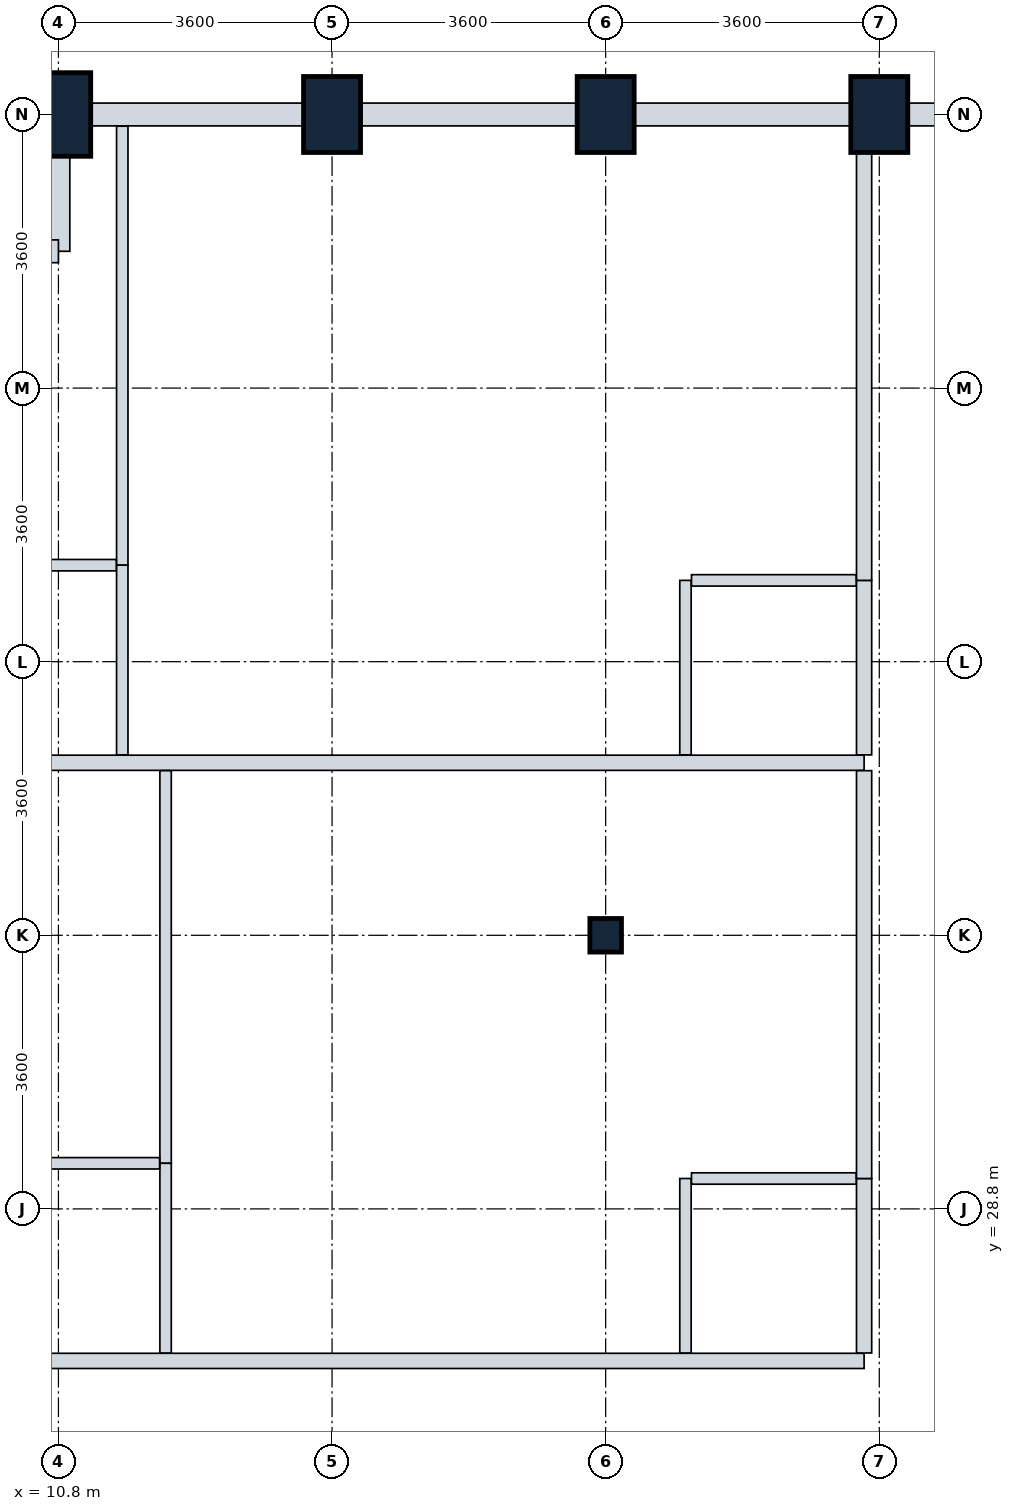
"""IFC4 building model, lengths in metres.
Left out: names, types, materials, properties, quantities, classifications, styles, units other than length and angle.
Written with IfcOpenShell. Run it as: python <this file> out.ifc"""

import sys

from ifc_helpers import new_model, si_unit, direction, frame, frame_2d, origin, origin_2d, place, context, subcontext, project, spatial, rectangle, i_section, extrude, element, fill, save


model = new_model("IFC4")
c1 = context("Model", 3, precision=1e-05, world=origin(), true_north=direction((0.0, 1.0)))
c2 = subcontext(c1, "Body", "Model", "MODEL_VIEW")
j1 = project(units=[si_unit("LENGTHUNIT", "METRE"), si_unit("PLANEANGLEUNIT", "RADIAN")], contexts=[c1])
p1 = place(None, origin())
s1 = spatial("IfcSite", under=j1, at=p1, CompositionType="ELEMENT")
p2 = place(p1, origin())
s2 = spatial("IfcBuilding", under=s1, at=p2, CompositionType="ELEMENT")
p3 = place(p2, frame((0.0, 0.0, 139.0)))
s3 = spatial("IfcBuildingStorey", under=s2, at=p3, CompositionType="ELEMENT", Elevation=139.0)
p4 = place(p3, frame((10.8, 43.2, 0.0), z_axis=(0.0, 0.0, 1.0), x_axis=(1.0, 0.0, 0.0)))
e1 = element("IfcColumn", 1, at=p4, inside=s3, PredefinedType="COLUMN", context=c2, shape_type="SweptSolid", body=[
    extrude(rectangle(XDim=0.85, YDim=1.1, at=origin_2d()), origin(), (0.0, 0.0, 1.0), 3.8),
])
p5 = place(p3, frame((14.4, 43.2, 0.0), z_axis=(0.0, 0.0, 1.0), x_axis=(1.0, 0.0, 0.0)))
e2 = element("IfcColumn", 2, at=p5, inside=s3, PredefinedType="COLUMN", context=c2, shape_type="SweptSolid", body=[
    extrude(rectangle(XDim=0.75, YDim=1.0, at=origin_2d()), origin(), (0.0, 0.0, 1.0), 3.8),
])
p6 = place(p3, frame((18.0, 32.4, 0.0), z_axis=(0.0, 0.0, 1.0), x_axis=(1.0, 0.0, 0.0)))
e3 = element("IfcColumn", 3, at=p6, inside=s3, PredefinedType="COLUMN", context=c2, shape_type="SweptSolid", body=[
    extrude(i_section(OverallWidth=0.416, OverallDepth=0.442, WebThickness=0.025, FlangeThickness=0.041, FilletRadius=0.015, at=origin_2d()), origin(), (0.0, 0.0, 1.0), 3.8),
])
for number, where, z_axis, x_axis in (
    (4, (18.0, 43.2, 0.0), (0.0, 0.0, 1.0), (1.0, 0.0, 0.0)),
    (5, (21.6, 43.2, 0.0), (0.0, 0.0, 1.0), (1.0, 0.0, 0.0)),
):
    element("IfcColumn", number, at=place(p3, frame(where, z_axis=z_axis, x_axis=x_axis)), inside=s3, PredefinedType="COLUMN", context=c2, shape_type="SweptSolid", body=[
        extrude(rectangle(XDim=0.75, YDim=1.0, at=origin_2d()), origin(), (0.0, 0.0, 1.0), 3.8),
    ])
p7 = place(p3, frame((21.6, 43.2, 0.0), z_axis=(0.0, 0.0, 1.0), x_axis=(1.0, 0.0, 0.0)))
e6 = element("IfcWall", 6, at=p7, inside=s3, PredefinedType="STANDARD", context=c2, shape_type="SweptSolid", body=[
    extrude(rectangle(XDim=3.6, YDim=0.3, at=frame_2d((1.8, 0.0))), origin(), (0.0, 0.0, 1.0), 2.93),
])
p8 = place(p3, frame((18.0, 43.2, 0.0), z_axis=(0.0, 0.0, 1.0), x_axis=(1.0, 0.0, 0.0)))
e7 = element("IfcWall", 7, at=p8, inside=s3, PredefinedType="STANDARD", context=c2, shape_type="SweptSolid", body=[
    extrude(rectangle(XDim=3.6, YDim=0.3, at=frame_2d((1.8, 0.0))), origin(), (0.0, 0.0, 1.0), 2.93),
])
p9 = place(p8, frame((0.75, 0.0, 0.85)))
e8 = element("IfcOpeningElement", 8, at=p9, cuts=e7, PredefinedType="OPENING", context=c2, shape_type="SweptSolid", body=[
    extrude(rectangle(XDim=2.1, YDim=1.35, at=frame_2d((1.05, 0.675))), frame((0.0, 0.16, 0.0), z_axis=(0.0, -1.0, 0.0), x_axis=(1.0, 0.0, 0.0)), (0.0, 0.0, 1.0), 0.32),
])
p10 = place(p3, frame((14.4, 43.2, 0.0), z_axis=(0.0, 0.0, 1.0), x_axis=(1.0, 0.0, 0.0)))
e9 = element("IfcWall", 9, at=p10, inside=s3, PredefinedType="STANDARD", context=c2, shape_type="SweptSolid", body=[
    extrude(rectangle(XDim=3.6, YDim=0.3, at=frame_2d((1.8, 0.0))), origin(), (0.0, 0.0, 1.0), 2.93),
])
p11 = place(p10, frame((0.75, 0.0, 0.85)))
e10 = element("IfcOpeningElement", 10, at=p11, cuts=e9, PredefinedType="OPENING", context=c2, shape_type="SweptSolid", body=[
    extrude(rectangle(XDim=2.1, YDim=1.35, at=frame_2d((1.05, 0.675))), frame((0.0, 0.16, 0.0), z_axis=(0.0, -1.0, 0.0), x_axis=(1.0, 0.0, 0.0)), (0.0, 0.0, 1.0), 0.32),
])
p12 = place(p3, frame((10.8, 43.2, 0.0), z_axis=(0.0, 0.0, 1.0), x_axis=(1.0, 0.0, 0.0)))
e11 = element("IfcWall", 11, at=p12, inside=s3, PredefinedType="STANDARD", context=c2, shape_type="SweptSolid", body=[
    extrude(rectangle(XDim=3.6, YDim=0.3, at=frame_2d((1.8, 0.0))), origin(), (0.0, 0.0, 1.0), 2.93),
])
p13 = place(p3, frame((10.8, 41.4, 0.0), z_axis=(0.0, 0.0, 1.0), x_axis=(0.0, 1.0, 0.0)))
e12 = element("IfcWall", 12, at=p13, inside=s3, PredefinedType="STANDARD", context=c2, shape_type="SweptSolid", body=[
    extrude(rectangle(XDim=1.8, YDim=0.3, at=frame_2d((0.9, 0.0))), origin(), (0.0, 0.0, 1.0), 2.93),
])
p14 = place(p13, frame((0.18, 0.0, 0.85)))
e13 = element("IfcOpeningElement", 13, at=p14, cuts=e12, PredefinedType="OPENING", context=c2, shape_type="SweptSolid", body=[
    extrude(rectangle(XDim=0.75, YDim=1.05, at=frame_2d((0.375, 0.525))), frame((0.0, 0.16, 0.0), z_axis=(0.0, -1.0, 0.0), x_axis=(1.0, 0.0, 0.0)), (0.0, 0.0, 1.0), 0.32),
])
p15 = place(p3, frame((9.0, 41.4, 0.0), z_axis=(0.0, 0.0, 1.0), x_axis=(1.0, 0.0, 0.0)))
e14 = element("IfcWall", 14, at=p15, inside=s3, PredefinedType="STANDARD", context=c2, shape_type="SweptSolid", body=[
    extrude(rectangle(XDim=1.8, YDim=0.3, at=frame_2d((0.9, 0.0))), origin(), (0.0, 0.0, 1.0), 3.535),
])
for number, where, z_axis, x_axis in (
    (15, (7.354, 26.8, 0.0), (0.0, 0.0, 1.0), (1.0, 0.0, 0.0)),
    (16, (7.354, 34.67, 0.0), (0.0, 0.0, 1.0), (1.0, 0.0, 0.0)),
):
    element("IfcWall", number, at=place(p3, frame(where, z_axis=z_axis, x_axis=x_axis)), inside=s3, PredefinedType="PARTITIONING", context=c2, shape_type="SweptSolid", body=[
        extrude(rectangle(XDim=14.046, YDim=0.2, at=frame_2d((7.023, 0.0))), origin(), (0.0, 0.0, 1.0), 2.93),
    ])
p16 = place(p3, frame((21.4, 26.904, 0.0), z_axis=(0.0, 0.0, 1.0), x_axis=(0.0, 1.0, 0.0)))
e17 = element("IfcWall", 17, at=p16, inside=s3, PredefinedType="PARTITIONING", context=c2, shape_type="SweptSolid", body=[
    extrude(rectangle(XDim=2.296, YDim=0.2, at=frame_2d((1.148, 0.0))), origin(), (0.0, 0.0, 1.0), 3.13),
])
p17 = place(p3, frame((19.05, 26.904, 0.0), z_axis=(0.0, 0.0, 1.0), x_axis=(0.0, 1.0, 0.0)))
e18 = element("IfcWall", 18, at=p17, inside=s3, PredefinedType="PARTITIONING", context=c2, shape_type="SweptSolid", body=[
    extrude(rectangle(XDim=2.296, YDim=0.15, at=frame_2d((1.148, 0.0))), origin(), (0.0, 0.0, 1.0), 3.17),
])
p18 = place(p3, frame((19.129, 29.2, 0.0), z_axis=(0.0, 0.0, 1.0), x_axis=(1.0, 0.0, 0.0)))
e19 = element("IfcWall", 19, at=p18, inside=s3, PredefinedType="PARTITIONING", context=c2, shape_type="SweptSolid", body=[
    extrude(rectangle(XDim=2.167, YDim=0.15, at=frame_2d((1.083, 0.0))), origin(), (0.0, 0.0, 1.0), 3.535),
])
p19 = place(p18, frame((0.641, 0.0, 0.0)))
e20 = element("IfcOpeningElement", 20, at=p19, cuts=e19, PredefinedType="OPENING", context=c2, shape_type="SweptSolid", body=[
    extrude(rectangle(XDim=0.85, YDim=2.1, at=frame_2d((0.425, 1.05))), frame((0.0, 0.085, 0.0), z_axis=(0.0, -1.0, 0.0), x_axis=(1.0, 0.0, 0.0)), (0.0, 0.0, 1.0), 0.17),
])
p20 = place(p3, frame((21.4, 29.2, 0.0), z_axis=(0.0, 0.0, 1.0), x_axis=(0.0, 1.0, 0.0)))
e21 = element("IfcWall", 21, at=p20, inside=s3, PredefinedType="PARTITIONING", context=c2, shape_type="SweptSolid", body=[
    extrude(rectangle(XDim=5.366, YDim=0.2, at=frame_2d((2.683, 0.0))), origin(), (0.0, 0.0, 1.0), 3.13),
])
p21 = place(p20, frame((1.557, 0.0, 0.0)))
e22 = element("IfcOpeningElement", 22, at=p21, cuts=e21, PredefinedType="OPENING", context=c2, shape_type="SweptSolid", body=[
    extrude(rectangle(XDim=1.0, YDim=2.1, at=frame_2d((0.5, 1.05))), frame((0.0, 0.11, 0.0), z_axis=(0.0, -1.0, 0.0), x_axis=(1.0, 0.0, 0.0)), (0.0, 0.0, 1.0), 0.22),
])
p22 = place(p3, frame((12.21, 29.4, 0.0), z_axis=(0.0, 0.0, 1.0), x_axis=(0.0, 1.0, 0.0)))
e23 = element("IfcWall", 23, at=p22, inside=s3, PredefinedType="PARTITIONING", context=c2, shape_type="SweptSolid", body=[
    extrude(rectangle(XDim=5.166, YDim=0.15, at=frame_2d((2.583, 0.0))), origin(), (0.0, 0.0, 1.0), 3.18),
])
p23 = place(p22, frame((2.185, 0.0, 0.0)))
e24 = element("IfcOpeningElement", 24, at=p23, cuts=e23, PredefinedType="OPENING", context=c2, shape_type="SweptSolid", body=[
    extrude(rectangle(XDim=0.9, YDim=2.1, at=frame_2d((0.45, 1.05))), frame((0.0, 0.085, 0.0), z_axis=(0.0, -1.0, 0.0), x_axis=(1.0, 0.0, 0.0)), (0.0, 0.0, 1.0), 0.17),
])
p24 = place(p3, frame((12.21, 26.904, 0.0), z_axis=(0.0, 0.0, 1.0), x_axis=(0.0, 1.0, 0.0)))
e25 = element("IfcWall", 25, at=p24, inside=s3, PredefinedType="PARTITIONING", context=c2, shape_type="SweptSolid", body=[
    extrude(rectangle(XDim=2.496, YDim=0.15, at=frame_2d((1.248, 0.0))), origin(), (0.0, 0.0, 1.0), 3.17),
])
p25 = place(p24, frame((0.731, 0.0, 0.0)))
e26 = element("IfcOpeningElement", 26, at=p25, cuts=e25, PredefinedType="OPENING", context=c2, shape_type="SweptSolid", body=[
    extrude(rectangle(XDim=0.85, YDim=2.1, at=frame_2d((0.425, 1.05))), frame((0.0, 0.085, 0.0), z_axis=(0.0, -1.0, 0.0), x_axis=(1.0, 0.0, 0.0)), (0.0, 0.0, 1.0), 0.17),
])
p26 = place(p3, frame((7.354, 29.4, 0.0), z_axis=(0.0, 0.0, 1.0), x_axis=(1.0, 0.0, 0.0)))
e27 = element("IfcWall", 27, at=p26, inside=s3, PredefinedType="PARTITIONING", context=c2, shape_type="SweptSolid", body=[
    extrude(rectangle(XDim=4.777, YDim=0.15, at=frame_2d((2.389, 0.0))), origin(), (0.0, 0.0, 1.0), 2.93),
])
p27 = place(p3, frame((21.4, 34.774, 0.0), z_axis=(0.0, 0.0, 1.0), x_axis=(0.0, 1.0, 0.0)))
e28 = element("IfcWall", 28, at=p27, inside=s3, PredefinedType="PARTITIONING", context=c2, shape_type="SweptSolid", body=[
    extrude(rectangle(XDim=2.296, YDim=0.2, at=frame_2d((1.148, 0.0))), origin(), (0.0, 0.0, 1.0), 3.17),
])
p28 = place(p3, frame((19.05, 34.774, 0.0), z_axis=(0.0, 0.0, 1.0), x_axis=(0.0, 1.0, 0.0)))
e29 = element("IfcWall", 29, at=p28, inside=s3, PredefinedType="PARTITIONING", context=c2, shape_type="SweptSolid", body=[
    extrude(rectangle(XDim=2.296, YDim=0.15, at=frame_2d((1.148, 0.0))), origin(), (0.0, 0.0, 1.0), 3.17),
])
p29 = place(p3, frame((19.129, 37.07, 0.0), z_axis=(0.0, 0.0, 1.0), x_axis=(1.0, 0.0, 0.0)))
e30 = element("IfcWall", 30, at=p29, inside=s3, PredefinedType="PARTITIONING", context=c2, shape_type="SweptSolid", body=[
    extrude(rectangle(XDim=2.167, YDim=0.15, at=frame_2d((1.083, 0.0))), origin(), (0.0, 0.0, 1.0), 3.535),
])
p30 = place(p29, frame((0.641, 0.0, 0.0)))
e31 = element("IfcOpeningElement", 31, at=p30, cuts=e30, PredefinedType="OPENING", context=c2, shape_type="SweptSolid", body=[
    extrude(rectangle(XDim=0.85, YDim=2.1, at=frame_2d((0.425, 1.05))), frame((0.0, 0.085, 0.0), z_axis=(0.0, -1.0, 0.0), x_axis=(1.0, 0.0, 0.0)), (0.0, 0.0, 1.0), 0.17),
])
p31 = place(p3, frame((21.4, 37.07, 0.0), z_axis=(0.0, 0.0, 1.0), x_axis=(0.0, 1.0, 0.0)))
e32 = element("IfcWall", 32, at=p31, inside=s3, PredefinedType="PARTITIONING", context=c2, shape_type="SweptSolid", body=[
    extrude(rectangle(XDim=5.976, YDim=0.2, at=frame_2d((2.988, 0.0))), origin(), (0.0, 0.0, 1.0), 2.93),
])
p32 = place(p31, frame((1.226, 0.0, 0.0)))
e33 = element("IfcOpeningElement", 33, at=p32, cuts=e32, PredefinedType="OPENING", context=c2, shape_type="SweptSolid", body=[
    extrude(rectangle(XDim=1.0, YDim=2.1, at=frame_2d((0.5, 1.05))), frame((0.0, 0.11, 0.0), z_axis=(0.0, -1.0, 0.0), x_axis=(1.0, 0.0, 0.0)), (0.0, 0.0, 1.0), 0.22),
])
p33 = place(p3, frame((11.64, 37.27, 0.0), z_axis=(0.0, 0.0, 1.0), x_axis=(0.0, 1.0, 0.0)))
e34 = element("IfcWall", 34, at=p33, inside=s3, PredefinedType="PARTITIONING", context=c2, shape_type="SweptSolid", body=[
    extrude(rectangle(XDim=5.776, YDim=0.15, at=frame_2d((2.888, 0.0))), origin(), (0.0, 0.0, 1.0), 2.93),
])
p34 = place(p33, frame((1.876, 0.0, 0.0)))
e35 = element("IfcOpeningElement", 35, at=p34, cuts=e34, PredefinedType="OPENING", context=c2, shape_type="SweptSolid", body=[
    extrude(rectangle(XDim=0.9, YDim=2.1, at=frame_2d((0.45, 1.05))), frame((0.0, 0.085, 0.0), z_axis=(0.0, -1.0, 0.0), x_axis=(1.0, 0.0, 0.0)), (0.0, 0.0, 1.0), 0.17),
])
p35 = place(p3, frame((11.64, 34.774, 0.0), z_axis=(0.0, 0.0, 1.0), x_axis=(0.0, 1.0, 0.0)))
e36 = element("IfcWall", 36, at=p35, inside=s3, PredefinedType="PARTITIONING", context=c2, shape_type="SweptSolid", body=[
    extrude(rectangle(XDim=2.496, YDim=0.15, at=frame_2d((1.248, 0.0))), origin(), (0.0, 0.0, 1.0), 3.17),
])
p36 = place(p35, frame((0.731, 0.0, 0.0)))
e37 = element("IfcOpeningElement", 37, at=p36, cuts=e36, PredefinedType="OPENING", context=c2, shape_type="SweptSolid", body=[
    extrude(rectangle(XDim=0.85, YDim=2.1, at=frame_2d((0.425, 1.05))), frame((0.0, 0.085, 0.0), z_axis=(0.0, -1.0, 0.0), x_axis=(1.0, 0.0, 0.0)), (0.0, 0.0, 1.0), 0.17),
])
p37 = place(p3, frame((7.354, 37.27, 0.0), z_axis=(0.0, 0.0, 1.0), x_axis=(1.0, 0.0, 0.0)))
e38 = element("IfcWall", 38, at=p37, inside=s3, PredefinedType="PARTITIONING", context=c2, shape_type="SweptSolid", body=[
    extrude(rectangle(XDim=4.207, YDim=0.15, at=frame_2d((2.104, 0.0))), origin(), (0.0, 0.0, 1.0), 2.93),
])
p38 = place(p9, origin())
e39 = element("IfcWindow", 39, at=p38, inside=s3, PartitioningType="SINGLE_PANEL", PredefinedType="WINDOW", context=c2, shape_type="SweptSolid", body=[
    extrude(rectangle(XDim=2.1, YDim=1.35, at=frame_2d((1.05, 0.675))), frame((0.0, 0.03, 0.0), z_axis=(0.0, -1.0, 0.0), x_axis=(1.0, 0.0, 0.0)), (0.0, 0.0, 1.0), 0.06),
])
fill(e8, e39)
p39 = place(p11, origin())
e40 = element("IfcWindow", 40, at=p39, inside=s3, PartitioningType="SINGLE_PANEL", PredefinedType="WINDOW", context=c2, shape_type="SweptSolid", body=[
    extrude(rectangle(XDim=2.1, YDim=1.35, at=frame_2d((1.05, 0.675))), frame((0.0, 0.03, 0.0), z_axis=(0.0, -1.0, 0.0), x_axis=(1.0, 0.0, 0.0)), (0.0, 0.0, 1.0), 0.06),
])
fill(e10, e40)
p40 = place(p19, origin())
e41 = element("IfcDoor", 41, at=p40, inside=s3, OperationType="SINGLE_SWING_RIGHT", PredefinedType="DOOR", context=c2, shape_type="SweptSolid", body=[
    extrude(rectangle(XDim=0.85, YDim=2.1, at=frame_2d((0.425, 1.05))), frame((0.0, 0.025, 0.0), z_axis=(0.0, -1.0, 0.0), x_axis=(1.0, 0.0, 0.0)), (0.0, 0.0, 1.0), 0.05),
])
fill(e20, e41)
p41 = place(p21, origin())
e42 = element("IfcDoor", 42, at=p41, inside=s3, OperationType="SINGLE_SWING_LEFT", PredefinedType="DOOR", context=c2, shape_type="SweptSolid", body=[
    extrude(rectangle(XDim=1.0, YDim=2.1, at=frame_2d((0.5, 1.05))), frame((0.0, 0.025, 0.0), z_axis=(0.0, -1.0, 0.0), x_axis=(1.0, 0.0, 0.0)), (0.0, 0.0, 1.0), 0.05),
])
fill(e22, e42)
p42 = place(p23, origin())
e43 = element("IfcDoor", 43, at=p42, inside=s3, OperationType="SINGLE_SWING_LEFT", PredefinedType="DOOR", context=c2, shape_type="SweptSolid", body=[
    extrude(rectangle(XDim=0.9, YDim=2.1, at=frame_2d((0.45, 1.05))), frame((0.0, 0.025, 0.0), z_axis=(0.0, -1.0, 0.0), x_axis=(1.0, 0.0, 0.0)), (0.0, 0.0, 1.0), 0.05),
])
fill(e24, e43)
p43 = place(p25, origin())
e44 = element("IfcDoor", 44, at=p43, inside=s3, OperationType="SINGLE_SWING_RIGHT", PredefinedType="DOOR", context=c2, shape_type="SweptSolid", body=[
    extrude(rectangle(XDim=0.85, YDim=2.1, at=frame_2d((0.425, 1.05))), frame((0.0, 0.025, 0.0), z_axis=(0.0, -1.0, 0.0), x_axis=(1.0, 0.0, 0.0)), (0.0, 0.0, 1.0), 0.05),
])
fill(e26, e44)
p44 = place(p30, origin())
e45 = element("IfcDoor", 45, at=p44, inside=s3, OperationType="SINGLE_SWING_RIGHT", PredefinedType="DOOR", context=c2, shape_type="SweptSolid", body=[
    extrude(rectangle(XDim=0.85, YDim=2.1, at=frame_2d((0.425, 1.05))), frame((0.0, 0.025, 0.0), z_axis=(0.0, -1.0, 0.0), x_axis=(1.0, 0.0, 0.0)), (0.0, 0.0, 1.0), 0.05),
])
fill(e31, e45)
p45 = place(p32, origin())
e46 = element("IfcDoor", 46, at=p45, inside=s3, OperationType="SINGLE_SWING_LEFT", PredefinedType="DOOR", context=c2, shape_type="SweptSolid", body=[
    extrude(rectangle(XDim=1.0, YDim=2.1, at=frame_2d((0.5, 1.05))), frame((0.0, 0.025, 0.0), z_axis=(0.0, -1.0, 0.0), x_axis=(1.0, 0.0, 0.0)), (0.0, 0.0, 1.0), 0.05),
])
fill(e33, e46)
p46 = place(p34, origin())
e47 = element("IfcDoor", 47, at=p46, inside=s3, OperationType="SINGLE_SWING_LEFT", PredefinedType="DOOR", context=c2, shape_type="SweptSolid", body=[
    extrude(rectangle(XDim=0.9, YDim=2.1, at=frame_2d((0.45, 1.05))), frame((0.0, 0.025, 0.0), z_axis=(0.0, -1.0, 0.0), x_axis=(1.0, 0.0, 0.0)), (0.0, 0.0, 1.0), 0.05),
])
fill(e35, e47)
p47 = place(p36, origin())
e48 = element("IfcDoor", 48, at=p47, inside=s3, OperationType="SINGLE_SWING_RIGHT", PredefinedType="DOOR", context=c2, shape_type="SweptSolid", body=[
    extrude(rectangle(XDim=0.85, YDim=2.1, at=frame_2d((0.425, 1.05))), frame((0.0, 0.025, 0.0), z_axis=(0.0, -1.0, 0.0), x_axis=(1.0, 0.0, 0.0)), (0.0, 0.0, 1.0), 0.05),
])
fill(e37, e48)
p48 = place(p14, origin())
e49 = element("IfcWindow", 49, at=p48, inside=s3, PartitioningType="SINGLE_PANEL", PredefinedType="WINDOW", context=c2, shape_type="SweptSolid", body=[
    extrude(rectangle(XDim=0.75, YDim=1.05, at=frame_2d((0.375, 0.525))), frame((0.0, 0.03, 0.0), z_axis=(0.0, -1.0, 0.0), x_axis=(1.0, 0.0, 0.0)), (0.0, 0.0, 1.0), 0.06),
])
fill(e13, e49)
save(model, sys.argv[1])
